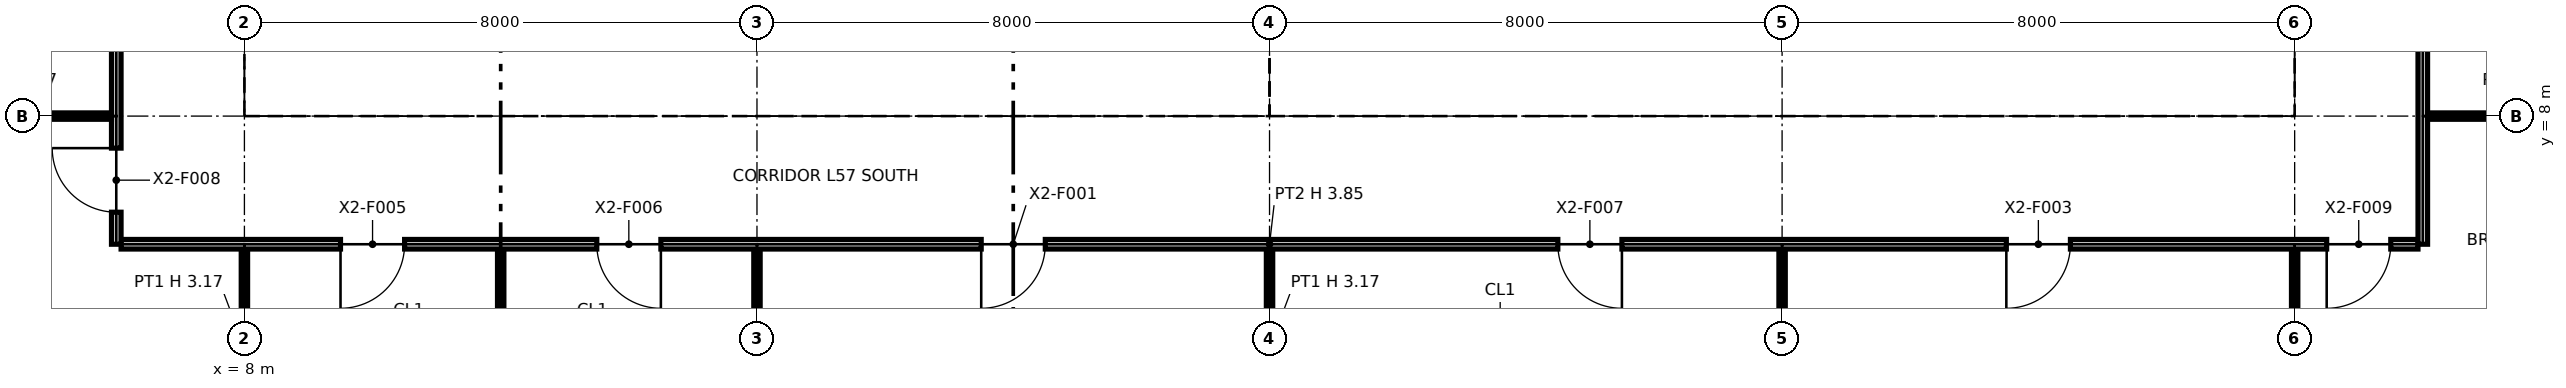
"""IFC4 building model, lengths in metres.
Left out: names, types, materials, properties, quantities, classifications, styles, units other than length and angle.
Written with IfcOpenShell. Run it as: python <this file> out.ifc"""

import sys

from ifc_helpers import new_model, si_unit, direction, frame, frame_2d, origin, origin_2d, place, context, subcontext, project, spatial, polyline, rectangle, i_section, outline, extrude, element, fill, save


model = new_model("IFC4")
c1 = context("Model", 3, precision=1e-05, world=origin(), true_north=direction((0.0, 1.0)))
c2 = subcontext(c1, "Body", "Model", "MODEL_VIEW")
j1 = project(units=[si_unit("LENGTHUNIT", "METRE"), si_unit("PLANEANGLEUNIT", "RADIAN")], contexts=[c1])
p1 = place(None, origin())
s1 = spatial("IfcSite", under=j1, at=p1, CompositionType="ELEMENT")
p2 = place(p1, origin())
s2 = spatial("IfcBuilding", under=s1, at=p2, CompositionType="ELEMENT")
p3 = place(p2, frame((0.0, 0.0, 263.0)))
s3 = spatial("IfcBuildingStorey", under=s2, at=p3, CompositionType="ELEMENT", Elevation=263.0)
for number, where, z_axis, x_axis in (
    (1, (8.0, 8.0, 0.0), (0.0, 0.0, 1.0), (1.0, 0.0, 0.0)),
    (2, (16.0, 8.0, 0.0), (0.0, 0.0, 1.0), (1.0, 0.0, 0.0)),
):
    element("IfcColumn", number, at=place(p3, frame(where, z_axis=z_axis, x_axis=x_axis)), inside=s3, PredefinedType="COLUMN", context=c2, shape_type="SweptSolid", body=[
        extrude(i_section(OverallWidth=0.371, OverallDepth=0.361, WebThickness=0.012, FlangeThickness=0.02, at=origin_2d()), origin(), (0.0, 0.0, 1.0), 3.85),
    ])
p4 = place(p3, frame((24.0, 8.0, 0.0), z_axis=(0.0, 0.0, 1.0), x_axis=(1.0, 0.0, 0.0)))
e3 = element("IfcColumn", 3, at=p4, inside=s3, PredefinedType="COLUMN", context=c2, shape_type="SweptSolid", body=[
    extrude(i_section(OverallWidth=0.373, OverallDepth=0.368, WebThickness=0.015, FlangeThickness=0.024, at=origin_2d()), origin(), (0.0, 0.0, 1.0), 3.85),
])
for number, where, z_axis, x_axis in (
    (4, (32.0, 8.0, 0.0), (0.0, 0.0, 1.0), (1.0, 0.0, 0.0)),
    (5, (40.0, 8.0, 0.0), (0.0, 0.0, 1.0), (1.0, 0.0, 0.0)),
):
    element("IfcColumn", number, at=place(p3, frame(where, z_axis=z_axis, x_axis=x_axis)), inside=s3, PredefinedType="COLUMN", context=c2, shape_type="SweptSolid", body=[
        extrude(i_section(OverallWidth=0.371, OverallDepth=0.361, WebThickness=0.012, FlangeThickness=0.02, at=origin_2d()), origin(), (0.0, 0.0, 1.0), 3.85),
    ])
p5 = place(p3, frame((8.65, 8.75, 0.0), z_axis=(0.0, 0.0, 1.0), x_axis=(1.0, 0.0, 0.0)))
e6 = element("IfcWall", 6, at=p5, inside=s3, PredefinedType="PARTITIONING", context=c2, shape_type="SweptSolid", body=[
    extrude(outline(polyline([(0.0, 0.0), (14.7, 0.0), (14.7, 3.85), (7.438, 3.85), (7.438, 3.308), (7.262, 3.308), (7.261, 3.85), (0.0, 3.85), (0.0, 0.0)])), frame((0.0, 0.1, 0.0), z_axis=(0.0, -1.0, 0.0), x_axis=(1.0, 0.0, 0.0)), (0.0, 0.0, 1.0), 0.2),
])
p6 = place(p5, frame((1.3, 0.0, 0.0)))
e7 = element("IfcOpeningElement", 7, at=p6, cuts=e6, PredefinedType="OPENING", context=c2, shape_type="SweptSolid", body=[
    extrude(rectangle(XDim=1.4, YDim=2.1, at=frame_2d((0.7, 1.05))), frame((0.0, 0.11, 0.0), z_axis=(0.0, -1.0, 0.0), x_axis=(1.0, 0.0, 0.0)), (0.0, 0.0, 1.0), 0.22),
])
p7 = place(p5, frame((4.6, 0.0, 0.0)))
e8 = element("IfcOpeningElement", 8, at=p7, cuts=e6, PredefinedType="OPENING", context=c2, shape_type="SweptSolid", body=[
    extrude(rectangle(XDim=1.4, YDim=2.1, at=frame_2d((0.7, 1.05))), frame((0.0, 0.11, 0.0), z_axis=(0.0, -1.0, 0.0), x_axis=(1.0, 0.0, 0.0)), (0.0, 0.0, 1.0), 0.22),
])
p8 = place(p5, frame((10.4, 0.0, 0.0)))
e9 = element("IfcOpeningElement", 9, at=p8, cuts=e6, PredefinedType="OPENING", context=c2, shape_type="SweptSolid", body=[
    extrude(rectangle(XDim=1.2, YDim=2.1, at=frame_2d((0.6, 1.05))), frame((0.0, 0.11, 0.0), z_axis=(0.0, -1.0, 0.0), x_axis=(1.0, 0.0, 0.0)), (0.0, 0.0, 1.0), 0.22),
])
p9 = place(p3, frame((8.75, 8.85, 0.0), z_axis=(0.0, 0.0, 1.0), x_axis=(0.0, 1.0, 0.0)))
e10 = element("IfcWall", 10, at=p9, inside=s3, PredefinedType="PARTITIONING", context=c2, shape_type="SweptSolid", body=[
    extrude(outline(polyline([(0.0, 0.0), (14.3, 0.0), (14.3, 3.85), (10.225, 3.85), (10.224, 3.44), (10.076, 3.44), (10.075, 3.85), (7.239, 3.85), (7.238, 3.308), (7.062, 3.308), (7.062, 3.85), (0.0, 3.85), (0.0, 0.0)])), frame((0.0, 0.1, 0.0), z_axis=(0.0, -1.0, 0.0), x_axis=(1.0, 0.0, 0.0)), (0.0, 0.0, 1.0), 0.2),
])
p10 = place(p9, frame((8.3, 0.0, 0.0)))
e11 = element("IfcOpeningElement", 11, at=p10, cuts=e10, PredefinedType="OPENING", context=c2, shape_type="SweptSolid", body=[
    extrude(rectangle(XDim=1.8, YDim=2.1, at=frame_2d((0.9, 1.05))), frame((0.0, 0.11, 0.0), z_axis=(0.0, -1.0, 0.0), x_axis=(1.0, 0.0, 0.0)), (0.0, 0.0, 1.0), 0.22),
])
p11 = place(p3, frame((12.4, 8.85, 0.0), z_axis=(0.0, 0.0, 1.0), x_axis=(0.0, 1.0, 0.0)))
e12 = element("IfcWall", 12, at=p11, inside=s3, PredefinedType="PARTITIONING", context=c2, shape_type="SweptSolid", body=[
    extrude(rectangle(XDim=6.85, YDim=0.2, at=frame_2d((3.425, 0.0))), origin(), (0.0, 0.0, 1.0), 3.85),
])
p12 = place(p3, frame((15.85, 8.85, 0.0), z_axis=(0.0, 0.0, 1.0), x_axis=(0.0, 1.0, 0.0)))
e13 = element("IfcWall", 13, at=p12, inside=s3, PredefinedType="PARTITIONING", context=c2, shape_type="SweptSolid", body=[
    extrude(rectangle(XDim=1.55, YDim=0.9, at=frame_2d((0.775, 0.0))), origin(), (0.0, 0.0, 1.0), 3.308),
])
p13 = place(p12, frame((0.3, 0.0, 0.0)))
e14 = element("IfcOpeningElement", 14, at=p13, cuts=e13, PredefinedType="OPENING", context=c2, shape_type="SweptSolid", body=[
    extrude(rectangle(XDim=1.1, YDim=2.1, at=frame_2d((0.55, 1.05))), frame((0.0, 0.46, 0.0), z_axis=(0.0, -1.0, 0.0), x_axis=(1.0, 0.0, 0.0)), (0.0, 0.0, 1.0), 0.92),
])
p14 = place(p3, frame((23.25, 8.85, 0.0), z_axis=(0.0, 0.0, 1.0), x_axis=(0.0, 1.0, 0.0)))
e15 = element("IfcWall", 15, at=p14, inside=s3, PredefinedType="PARTITIONING", context=c2, shape_type="SweptSolid", body=[
    extrude(outline(polyline([(0.0, 0.0), (14.3, 0.0), (14.3, 3.85), (10.225, 3.85), (10.224, 3.44), (10.076, 3.44), (10.075, 3.85), (7.239, 3.85), (7.238, 3.308), (7.062, 3.308), (7.062, 3.85), (5.225, 3.85), (5.224, 3.44), (5.076, 3.44), (5.075, 3.85), (0.0, 3.85), (0.0, 0.0)])), frame((0.0, 0.1, 0.0), z_axis=(0.0, -1.0, 0.0), x_axis=(1.0, 0.0, 0.0)), (0.0, 0.0, 1.0), 0.2),
])
p15 = place(p14, frame((8.3, 0.0, 0.0)))
e16 = element("IfcOpeningElement", 16, at=p15, cuts=e15, PredefinedType="OPENING", context=c2, shape_type="SweptSolid", body=[
    extrude(rectangle(XDim=1.8, YDim=2.1, at=frame_2d((0.9, 1.05))), frame((0.0, 0.11, 0.0), z_axis=(0.0, -1.0, 0.0), x_axis=(1.0, 0.0, 0.0)), (0.0, 0.0, 1.0), 0.22),
])
p16 = place(p3, frame((24.65, 8.75, 0.0), z_axis=(0.0, 0.0, 1.0), x_axis=(1.0, 0.0, 0.0)))
e17 = element("IfcWall", 17, at=p16, inside=s3, PredefinedType="PARTITIONING", context=c2, shape_type="SweptSolid", body=[
    extrude(outline(polyline([(0.0, 0.0), (14.7, 0.0), (14.7, 3.85), (7.438, 3.85), (7.438, 3.308), (7.262, 3.308), (7.261, 3.85), (0.0, 3.85), (0.0, 0.0)])), frame((0.0, 0.1, 0.0), z_axis=(0.0, -1.0, 0.0), x_axis=(1.0, 0.0, 0.0)), (0.0, 0.0, 1.0), 0.2),
])
p17 = place(p3, frame((24.75, 8.85, 0.0), z_axis=(0.0, 0.0, 1.0), x_axis=(0.0, 1.0, 0.0)))
e18 = element("IfcWall", 18, at=p17, inside=s3, PredefinedType="PARTITIONING", context=c2, shape_type="SweptSolid", body=[
    extrude(outline(polyline([(0.0, 0.0), (6.3, 0.0), (6.3, 3.85), (3.225, 3.85), (3.224, 3.44), (3.076, 3.44), (3.075, 3.85), (0.0, 3.85), (0.0, 0.0)])), frame((0.0, 0.1, 0.0), z_axis=(0.0, -1.0, 0.0), x_axis=(1.0, 0.0, 0.0)), (0.0, 0.0, 1.0), 0.2),
])
for number, where, z_axis, x_axis in (
    (19, (27.2, 8.85, 0.0), (0.0, 0.0, 1.0), (0.0, 1.0, 0.0)),
    (20, (29.5, 8.85, 0.0), (0.0, 0.0, 1.0), (0.0, 1.0, 0.0)),
):
    element("IfcWall", number, at=place(p3, frame(where, z_axis=z_axis, x_axis=x_axis)), inside=s3, PredefinedType="PARTITIONING", context=c2, shape_type="SweptSolid", body=[
        extrude(rectangle(XDim=2.55, YDim=0.2, at=frame_2d((1.275, 0.0))), origin(), (0.0, 0.0, 1.0), 3.85),
    ])
p18 = place(p3, frame((32.0, 8.85, 0.0), z_axis=(0.0, 0.0, 1.0), x_axis=(0.0, 1.0, 0.0)))
e21 = element("IfcWall", 21, at=p18, inside=s3, PredefinedType="PARTITIONING", context=c2, shape_type="SweptSolid", body=[
    extrude(rectangle(XDim=2.55, YDim=0.6, at=frame_2d((1.275, 0.0))), origin(), (0.0, 0.0, 1.0), 3.308),
])
for number, where, z_axis, x_axis in (
    (22, (35.6, 8.85, 0.0), (0.0, 0.0, 1.0), (0.0, 1.0, 0.0)),
    (23, (39.25, 8.85, 0.0), (0.0, 0.0, 1.0), (0.0, 1.0, 0.0)),
):
    element("IfcWall", number, at=place(p3, frame(where, z_axis=z_axis, x_axis=x_axis)), inside=s3, PredefinedType="PARTITIONING", context=c2, shape_type="SweptSolid", body=[
        extrude(rectangle(XDim=6.3, YDim=0.2, at=frame_2d((3.15, 0.0))), origin(), (0.0, 0.0, 1.0), 3.85),
    ])
p19 = place(p3, frame((40.0, 2.0, 0.0), z_axis=(0.0, 0.0, 1.0), x_axis=(0.0, 1.0, 0.0)))
e24 = element("IfcWall", 24, at=p19, inside=s3, PredefinedType="PARTITIONING", context=c2, shape_type="SweptSolid", body=[
    extrude(rectangle(XDim=3.925, YDim=0.1, at=frame_2d((1.962, 0.0))), origin(), (0.0, 0.0, 1.0), 3.172),
])
for number, where, z_axis, x_axis in (
    (25, (8.0, 2.83, 0.0), (0.0, 0.0, 1.0), (0.0, 1.0, 0.0)),
    (26, (12.0, 2.83, 0.0), (0.0, 0.0, 1.0), (0.0, 1.0, 0.0)),
    (27, (16.0, 2.83, 0.0), (0.0, 0.0, 1.0), (0.0, 1.0, 0.0)),
    (28, (24.0, 2.83, 0.0), (0.0, 0.0, 1.0), (0.0, 1.0, 0.0)),
    (29, (32.0, 2.83, 0.0), (0.0, 0.0, 1.0), (0.0, 1.0, 0.0)),
):
    element("IfcWall", number, at=place(p3, frame(where, z_axis=z_axis, x_axis=x_axis)), inside=s3, PredefinedType="PARTITIONING", context=c2, shape_type="SweptSolid", body=[
        extrude(rectangle(XDim=3.095, YDim=0.1, at=frame_2d((1.547, 0.0))), origin(), (0.0, 0.0, 1.0), 3.172),
    ])
p20 = place(p3, frame((6.075, 6.0, 0.0), z_axis=(0.0, 0.0, 1.0), x_axis=(1.0, 0.0, 0.0)))
e30 = element("IfcWall", 30, at=p20, inside=s3, PredefinedType="PARTITIONING", context=c2, shape_type="SweptSolid", body=[
    extrude(rectangle(XDim=35.85, YDim=0.15, at=frame_2d((17.925, 0.0))), origin(), (0.0, 0.0, 1.0), 3.85),
])
p21 = place(p20, frame((14.425, 0.0, 0.0), z_axis=(0.0, 0.0, 1.0), x_axis=(-1.0, 0.0, 0.0)))
e31 = element("IfcOpeningElement", 31, at=p21, cuts=e30, PredefinedType="OPENING", context=c2, shape_type="SweptSolid", body=[
    extrude(rectangle(XDim=1.0, YDim=2.1, at=frame_2d((0.5, 1.05))), frame((0.0, 0.085, 0.0), z_axis=(0.0, -1.0, 0.0), x_axis=(1.0, 0.0, 0.0)), (0.0, 0.0, 1.0), 0.17),
])
p22 = place(p20, frame((30.425, 0.0, 0.0), z_axis=(0.0, 0.0, 1.0), x_axis=(-1.0, 0.0, 0.0)))
e32 = element("IfcOpeningElement", 32, at=p22, cuts=e30, PredefinedType="OPENING", context=c2, shape_type="SweptSolid", body=[
    extrude(rectangle(XDim=1.0, YDim=2.1, at=frame_2d((0.5, 1.05))), frame((0.0, 0.085, 0.0), z_axis=(0.0, -1.0, 0.0), x_axis=(1.0, 0.0, 0.0)), (0.0, 0.0, 1.0), 0.17),
])
p23 = place(p20, frame((4.425, 0.0, 0.0), z_axis=(0.0, 0.0, 1.0), x_axis=(-1.0, 0.0, 0.0)))
e33 = element("IfcOpeningElement", 33, at=p23, cuts=e30, PredefinedType="OPENING", context=c2, shape_type="SweptSolid", body=[
    extrude(rectangle(XDim=1.0, YDim=2.1, at=frame_2d((0.5, 1.05))), frame((0.0, 0.085, 0.0), z_axis=(0.0, -1.0, 0.0), x_axis=(1.0, 0.0, 0.0)), (0.0, 0.0, 1.0), 0.17),
])
p24 = place(p20, frame((8.425, 0.0, 0.0), z_axis=(0.0, 0.0, 1.0), x_axis=(-1.0, 0.0, 0.0)))
e34 = element("IfcOpeningElement", 34, at=p24, cuts=e30, PredefinedType="OPENING", context=c2, shape_type="SweptSolid", body=[
    extrude(rectangle(XDim=1.0, YDim=2.1, at=frame_2d((0.5, 1.05))), frame((0.0, 0.085, 0.0), z_axis=(0.0, -1.0, 0.0), x_axis=(1.0, 0.0, 0.0)), (0.0, 0.0, 1.0), 0.17),
])
p25 = place(p20, frame((23.425, 0.0, 0.0), z_axis=(0.0, 0.0, 1.0), x_axis=(-1.0, 0.0, 0.0)))
e35 = element("IfcOpeningElement", 35, at=p25, cuts=e30, PredefinedType="OPENING", context=c2, shape_type="SweptSolid", body=[
    extrude(rectangle(XDim=1.0, YDim=2.1, at=frame_2d((0.5, 1.05))), frame((0.0, 0.085, 0.0), z_axis=(0.0, -1.0, 0.0), x_axis=(1.0, 0.0, 0.0)), (0.0, 0.0, 1.0), 0.17),
])
p26 = place(p20, frame((35.425, 0.0, 0.0), z_axis=(0.0, 0.0, 1.0), x_axis=(-1.0, 0.0, 0.0)))
e36 = element("IfcOpeningElement", 36, at=p26, cuts=e30, PredefinedType="OPENING", context=c2, shape_type="SweptSolid", body=[
    extrude(rectangle(XDim=1.0, YDim=2.1, at=frame_2d((0.5, 1.05))), frame((0.0, 0.085, 0.0), z_axis=(0.0, -1.0, 0.0), x_axis=(1.0, 0.0, 0.0)), (0.0, 0.0, 1.0), 0.17),
])
p27 = place(p3, frame((6.0, 6.0, 0.0), z_axis=(0.0, 0.0, 1.0), x_axis=(0.0, 1.0, 0.0)))
e37 = element("IfcWall", 37, at=p27, inside=s3, PredefinedType="PARTITIONING", context=c2, shape_type="SweptSolid", body=[
    extrude(outline(polyline([(0.0, 0.0), (13.375, 0.0), (13.375, 3.85), (10.3, 3.85), (10.298, 3.172), (9.702, 3.172), (9.7, 3.85), (6.3, 3.85), (6.298, 3.172), (5.702, 3.172), (5.7, 3.85), (2.3, 3.85), (2.298, 3.172), (1.702, 3.172), (1.7, 3.85), (0.0, 3.85), (0.0, 0.0)])), frame((0.0, 0.075, 0.0), z_axis=(0.0, -1.0, 0.0), x_axis=(1.0, 0.0, 0.0)), (0.0, 0.0, 1.0), 0.15),
])
p28 = place(p27, frame((0.5, 0.0, 0.0)))
e38 = element("IfcOpeningElement", 38, at=p28, cuts=e37, PredefinedType="OPENING", context=c2, shape_type="SweptSolid", body=[
    extrude(rectangle(XDim=1.0, YDim=2.1, at=frame_2d((0.5, 1.05))), frame((0.0, 0.085, 0.0), z_axis=(0.0, -1.0, 0.0), x_axis=(1.0, 0.0, 0.0)), (0.0, 0.0, 1.0), 0.17),
])
p29 = place(p27, frame((5.5, 0.0, 0.0)))
e39 = element("IfcOpeningElement", 39, at=p29, cuts=e37, PredefinedType="OPENING", context=c2, shape_type="SweptSolid", body=[
    extrude(rectangle(XDim=1.0, YDim=2.1, at=frame_2d((0.5, 1.05))), frame((0.0, 0.085, 0.0), z_axis=(0.0, -1.0, 0.0), x_axis=(1.0, 0.0, 0.0)), (0.0, 0.0, 1.0), 0.17),
])
p30 = place(p27, frame((11.225, 0.0, 0.0)))
e40 = element("IfcOpeningElement", 40, at=p30, cuts=e37, PredefinedType="OPENING", context=c2, shape_type="SweptSolid", body=[
    extrude(rectangle(XDim=1.0, YDim=2.1, at=frame_2d((0.5, 1.05))), frame((0.0, 0.085, 0.0), z_axis=(0.0, -1.0, 0.0), x_axis=(1.0, 0.0, 0.0)), (0.0, 0.0, 1.0), 0.17),
])
p31 = place(p3, frame((42.0, 6.0, 0.0), z_axis=(0.0, 0.0, 1.0), x_axis=(0.0, 1.0, 0.0)))
e41 = element("IfcWall", 41, at=p31, inside=s3, PredefinedType="PARTITIONING", context=c2, shape_type="SweptSolid", body=[
    extrude(outline(polyline([(0.0, 0.0), (11.925, 0.0), (11.925, 3.85), (10.3, 3.85), (10.298, 3.172), (9.702, 3.172), (9.7, 3.85), (6.3, 3.85), (6.298, 3.172), (5.702, 3.172), (5.7, 3.85), (2.3, 3.85), (2.298, 3.172), (1.702, 3.172), (1.7, 3.85), (0.0, 3.85), (0.0, 0.0)])), frame((0.0, 0.075, 0.0), z_axis=(0.0, -1.0, 0.0), x_axis=(1.0, 0.0, 0.0)), (0.0, 0.0, 1.0), 0.15),
])
p32 = place(p31, frame((6.5, 0.0, 0.0), z_axis=(0.0, 0.0, 1.0), x_axis=(-1.0, 0.0, 0.0)))
e42 = element("IfcOpeningElement", 42, at=p32, cuts=e41, PredefinedType="OPENING", context=c2, shape_type="SweptSolid", body=[
    extrude(rectangle(XDim=1.0, YDim=2.1, at=frame_2d((0.5, 1.05))), frame((0.0, 0.085, 0.0), z_axis=(0.0, -1.0, 0.0), x_axis=(1.0, 0.0, 0.0)), (0.0, 0.0, 1.0), 0.17),
])
p33 = place(p31, frame((11.5, 0.0, 0.0), z_axis=(0.0, 0.0, 1.0), x_axis=(-1.0, 0.0, 0.0)))
e43 = element("IfcOpeningElement", 43, at=p33, cuts=e41, PredefinedType="OPENING", context=c2, shape_type="SweptSolid", body=[
    extrude(rectangle(XDim=1.0, YDim=2.1, at=frame_2d((0.5, 1.05))), frame((0.0, 0.085, 0.0), z_axis=(0.0, -1.0, 0.0), x_axis=(1.0, 0.0, 0.0)), (0.0, 0.0, 1.0), 0.17),
])
for number, where, z_axis, x_axis in (
    (44, (2.83, 8.0, 0.0), (0.0, 0.0, 1.0), (1.0, 0.0, 0.0)),
    (45, (42.075, 8.0, 0.0), (0.0, 0.0, 1.0), (1.0, 0.0, 0.0)),
):
    element("IfcWall", number, at=place(p3, frame(where, z_axis=z_axis, x_axis=x_axis)), inside=s3, PredefinedType="PARTITIONING", context=c2, shape_type="SweptSolid", body=[
        extrude(rectangle(XDim=3.095, YDim=0.1, at=frame_2d((1.547, 0.0))), origin(), (0.0, 0.0, 1.0), 3.172),
    ])
p34 = place(p6, origin())
e46 = element("IfcDoor", 46, at=p34, inside=s3, OperationType="DOUBLE_DOOR_SINGLE_SWING", PredefinedType="NOTDEFINED", context=c2, shape_type="SweptSolid", body=[
    extrude(rectangle(XDim=1.4, YDim=2.1, at=frame_2d((0.7, 1.05))), frame((0.0, 0.025, 0.0), z_axis=(0.0, -1.0, 0.0), x_axis=(1.0, 0.0, 0.0)), (0.0, 0.0, 1.0), 0.05),
])
fill(e7, e46)
p35 = place(p7, origin())
e47 = element("IfcDoor", 47, at=p35, inside=s3, OperationType="DOUBLE_DOOR_SINGLE_SWING", PredefinedType="NOTDEFINED", context=c2, shape_type="SweptSolid", body=[
    extrude(rectangle(XDim=1.4, YDim=2.1, at=frame_2d((0.7, 1.05))), frame((0.0, 0.025, 0.0), z_axis=(0.0, -1.0, 0.0), x_axis=(1.0, 0.0, 0.0)), (0.0, 0.0, 1.0), 0.05),
])
fill(e8, e47)
p36 = place(p8, origin())
e48 = element("IfcDoor", 48, at=p36, inside=s3, OperationType="SINGLE_SWING_LEFT", PredefinedType="NOTDEFINED", context=c2, shape_type="SweptSolid", body=[
    extrude(rectangle(XDim=1.2, YDim=2.1, at=frame_2d((0.6, 1.05))), frame((0.0, 0.025, 0.0), z_axis=(0.0, -1.0, 0.0), x_axis=(1.0, 0.0, 0.0)), (0.0, 0.0, 1.0), 0.05),
])
fill(e9, e48)
p37 = place(p21, origin())
e49 = element("IfcDoor", 49, at=p37, inside=s3, OperationType="SINGLE_SWING_RIGHT", PredefinedType="DOOR", context=c2, shape_type="SweptSolid", body=[
    extrude(rectangle(XDim=1.0, YDim=2.1, at=frame_2d((0.5, 1.05))), frame((0.0, 0.025, 0.0), z_axis=(0.0, -1.0, 0.0), x_axis=(1.0, 0.0, 0.0)), (0.0, 0.0, 1.0), 0.05),
])
fill(e31, e49)
p38 = place(p22, origin())
e50 = element("IfcDoor", 50, at=p38, inside=s3, OperationType="SINGLE_SWING_RIGHT", PredefinedType="DOOR", context=c2, shape_type="SweptSolid", body=[
    extrude(rectangle(XDim=1.0, YDim=2.1, at=frame_2d((0.5, 1.05))), frame((0.0, 0.025, 0.0), z_axis=(0.0, -1.0, 0.0), x_axis=(1.0, 0.0, 0.0)), (0.0, 0.0, 1.0), 0.05),
])
fill(e32, e50)
p39 = place(p23, origin())
e51 = element("IfcDoor", 51, at=p39, inside=s3, OperationType="SINGLE_SWING_RIGHT", PredefinedType="DOOR", context=c2, shape_type="SweptSolid", body=[
    extrude(rectangle(XDim=1.0, YDim=2.1, at=frame_2d((0.5, 1.05))), frame((0.0, 0.025, 0.0), z_axis=(0.0, -1.0, 0.0), x_axis=(1.0, 0.0, 0.0)), (0.0, 0.0, 1.0), 0.05),
])
fill(e33, e51)
p40 = place(p24, origin())
e52 = element("IfcDoor", 52, at=p40, inside=s3, OperationType="SINGLE_SWING_LEFT", PredefinedType="DOOR", context=c2, shape_type="SweptSolid", body=[
    extrude(rectangle(XDim=1.0, YDim=2.1, at=frame_2d((0.5, 1.05))), frame((0.0, 0.025, 0.0), z_axis=(0.0, -1.0, 0.0), x_axis=(1.0, 0.0, 0.0)), (0.0, 0.0, 1.0), 0.05),
])
fill(e34, e52)
p41 = place(p25, origin())
e53 = element("IfcDoor", 53, at=p41, inside=s3, OperationType="SINGLE_SWING_LEFT", PredefinedType="DOOR", context=c2, shape_type="SweptSolid", body=[
    extrude(rectangle(XDim=1.0, YDim=2.1, at=frame_2d((0.5, 1.05))), frame((0.0, 0.025, 0.0), z_axis=(0.0, -1.0, 0.0), x_axis=(1.0, 0.0, 0.0)), (0.0, 0.0, 1.0), 0.05),
])
fill(e35, e53)
p42 = place(p28, origin())
e54 = element("IfcDoor", 54, at=p42, inside=s3, OperationType="SINGLE_SWING_RIGHT", PredefinedType="DOOR", context=c2, shape_type="SweptSolid", body=[
    extrude(rectangle(XDim=1.0, YDim=2.1, at=frame_2d((0.5, 1.05))), frame((0.0, 0.025, 0.0), z_axis=(0.0, -1.0, 0.0), x_axis=(1.0, 0.0, 0.0)), (0.0, 0.0, 1.0), 0.05),
])
fill(e38, e54)
p43 = place(p26, origin())
e55 = element("IfcDoor", 55, at=p43, inside=s3, OperationType="SINGLE_SWING_RIGHT", PredefinedType="DOOR", context=c2, shape_type="SweptSolid", body=[
    extrude(rectangle(XDim=1.0, YDim=2.1, at=frame_2d((0.5, 1.05))), frame((0.0, 0.025, 0.0), z_axis=(0.0, -1.0, 0.0), x_axis=(1.0, 0.0, 0.0)), (0.0, 0.0, 1.0), 0.05),
])
fill(e36, e55)
save(model, sys.argv[1])
